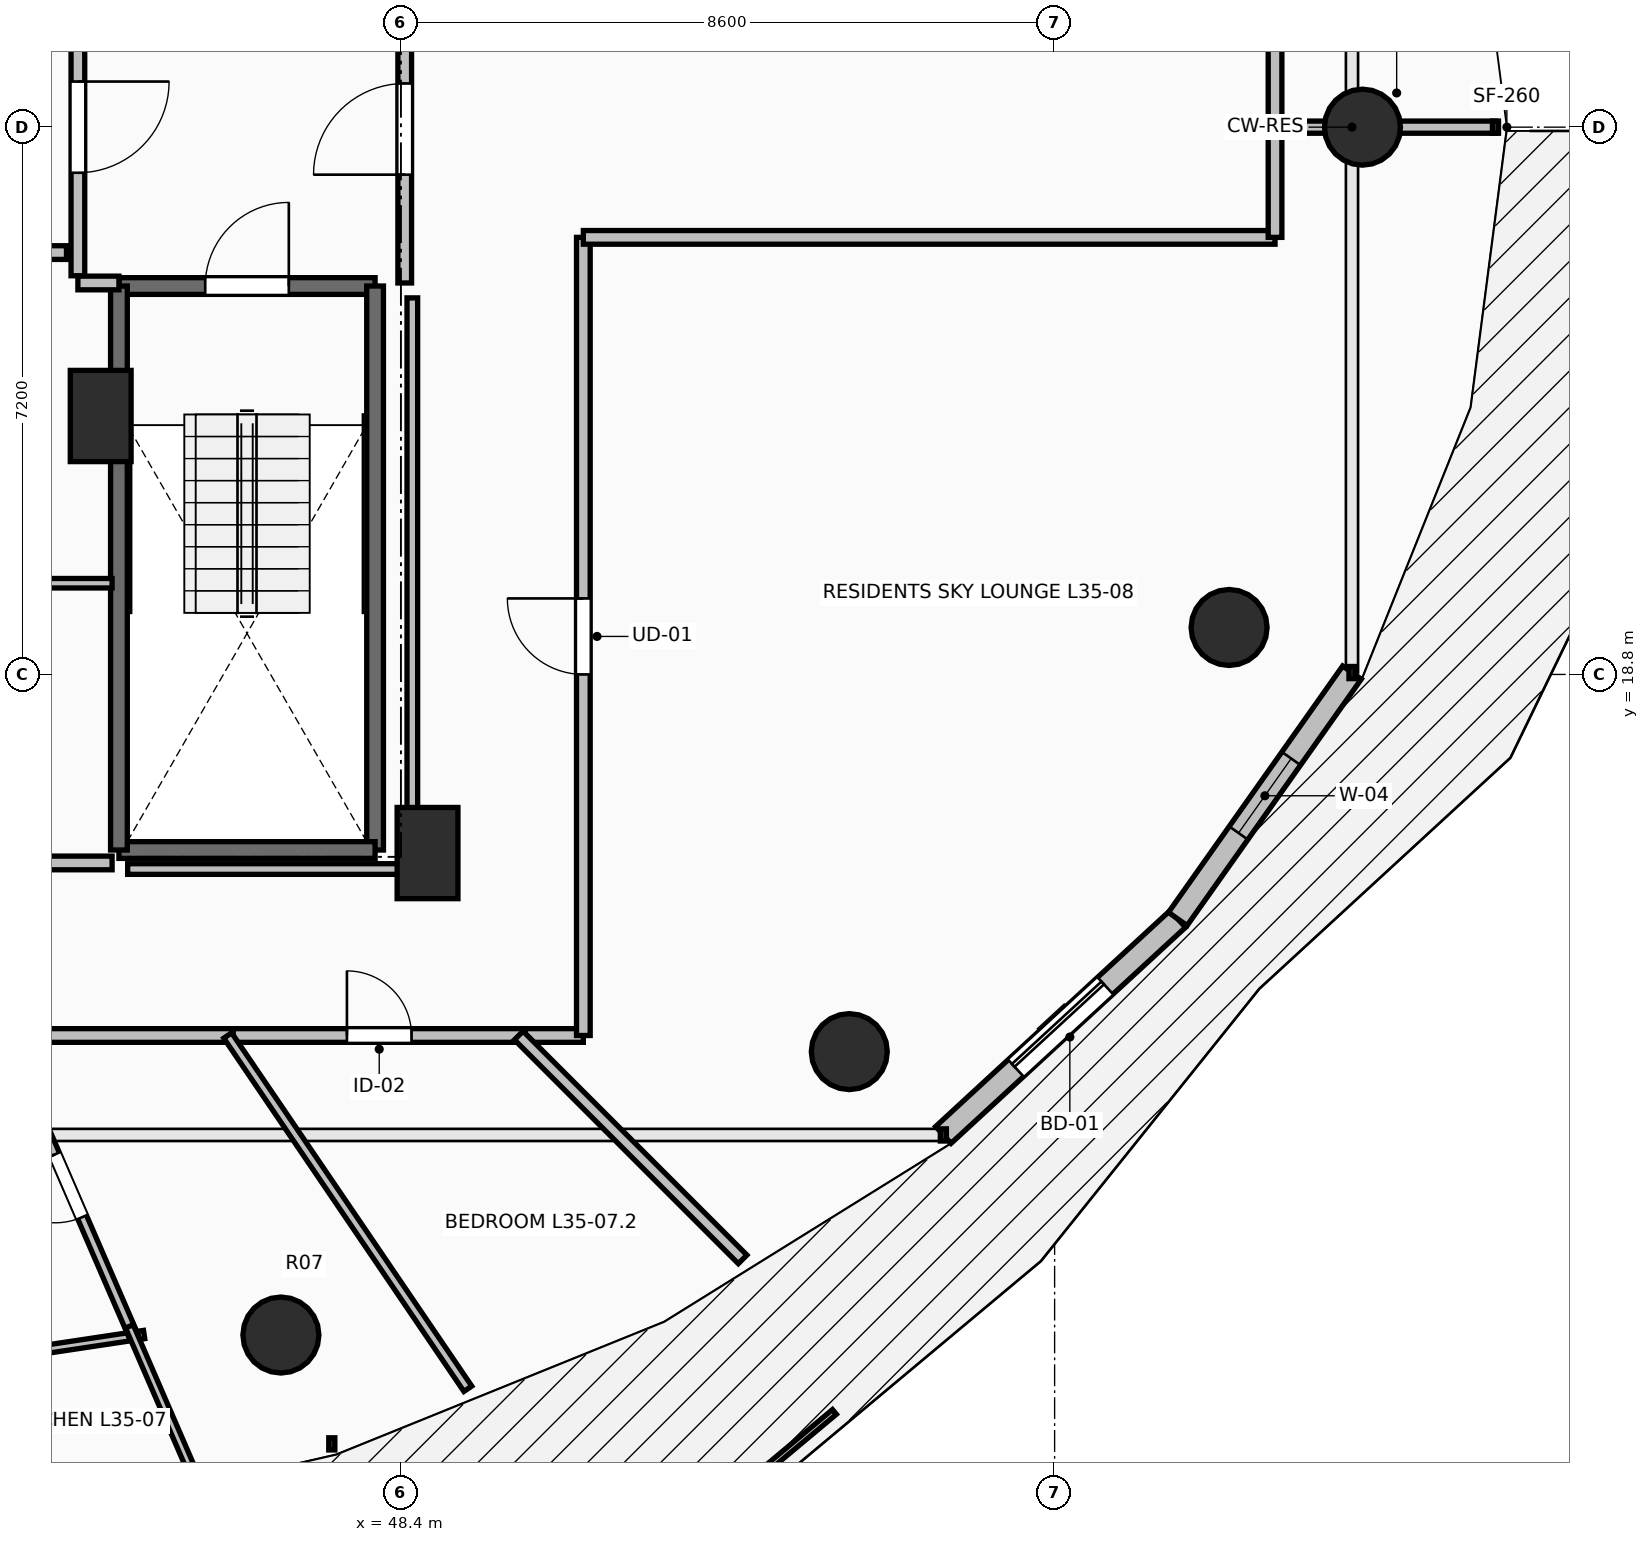
"""IFC4 building model, lengths in metres.
Left out: names, types, materials, properties, quantities, classifications, styles, units other than length and angle.
Written with IfcOpenShell. Run it as: python <this file> out.ifc"""

import sys

from ifc_helpers import new_model, si_unit, direction, frame, frame_2d, origin, origin_2d, place, context, subcontext, project, spatial, rectangle, circle, extrude, element, fill, save


model = new_model("IFC4")
c1 = context("Model", 3, precision=1e-05, world=origin(), true_north=direction((0.0, 1.0)))
c2 = subcontext(c1, "Body", "Model", "MODEL_VIEW")
j1 = project(units=[si_unit("LENGTHUNIT", "METRE"), si_unit("PLANEANGLEUNIT", "RADIAN")], contexts=[c1])
p1 = place(None, origin())
s1 = spatial("IfcSite", under=j1, at=p1, CompositionType="ELEMENT")
p2 = place(p1, origin())
s2 = spatial("IfcBuilding", under=s1, at=p2, CompositionType="ELEMENT")
p3 = place(p2, frame((0.0, 0.0, 132.6)))
s3 = spatial("IfcBuildingStorey", under=s2, at=p3, CompositionType="ELEMENT", Elevation=132.6)
for number, where, z_axis, x_axis in (
    (1, (61.05, 26.0, 0.0), (0.0, 0.0, 1.0), (1.0, 0.0, 0.0)),
    (2, (46.821, 10.109, 0.0), (0.0, 0.0, 1.0), (0.383, -0.924, 0.0)),
    (3, (54.299, 13.838, 0.0), (0.0, 0.0, 1.0), (0.707, -0.707, 0.0)),
    (4, (59.295, 19.418, 0.0), (0.0, 0.0, 1.0), (0.924, -0.383, 0.0)),
):
    element("IfcColumn", number, at=place(p3, frame(where, z_axis=z_axis, x_axis=x_axis)), inside=s3, PredefinedType="COLUMN", context=c2, shape_type="SweptSolid", body=[
        extrude(circle(Radius=0.5, at=origin_2d()), origin(), (0.0, 0.0, 1.0), 3.5),
    ])
for number, where, z_axis, x_axis in (
    (5, (48.75, 16.45, 0.0), (0.0, 0.0, 1.0), (1.0, 0.0, 0.0)),
    (6, (44.45, 22.2, 0.0), (0.0, 0.0, 1.0), (1.0, 0.0, 0.0)),
):
    element("IfcColumn", number, at=place(p3, frame(where, z_axis=z_axis, x_axis=x_axis)), inside=s3, PredefinedType="PILASTER", context=c2, shape_type="SweptSolid", body=[
        extrude(rectangle(XDim=0.8, YDim=1.2, at=origin_2d()), origin(), (0.0, 0.0, 1.0), 3.5),
    ])
p4 = place(p3, frame((55.536, 12.742, 0.0), z_axis=(0.0, 0.0, 1.0), x_axis=(0.735477154165, 0.677549522693, 0.0)))
e7 = element("IfcWall", 7, at=p4, inside=s3, PredefinedType="STANDARD", context=c2, shape_type="SweptSolid", body=[
    extrude(rectangle(XDim=4.194, YDim=0.3, at=frame_2d((2.097, 0.0))), origin(), (0.0, 0.0, 1.0), 3.24),
])
p5 = place(p4, frame((1.297, 0.0, 0.0)))
e8 = element("IfcOpeningElement", 8, at=p5, cuts=e7, PredefinedType="OPENING", context=c2, shape_type="SweptSolid", body=[
    extrude(rectangle(XDim=1.6, YDim=2.3, at=frame_2d((0.8, 1.15))), frame((0.0, 0.165, 0.0), z_axis=(0.0, -1.0, 0.0), x_axis=(1.0, 0.0, 0.0)), (0.0, 0.0, 1.0), 0.33),
])
p6 = place(p3, frame((58.62, 15.583, 0.0), z_axis=(0.0, 0.0, 1.0), x_axis=(0.577269753207, 0.816553508371, 0.0)))
e9 = element("IfcWall", 9, at=p6, inside=s3, PredefinedType="STANDARD", context=c2, shape_type="SweptSolid", body=[
    extrude(rectangle(XDim=3.97, YDim=0.3, at=frame_2d((1.985, 0.0))), origin(), (0.0, 0.0, 1.0), 3.24),
])
p7 = place(p6, frame((1.385, 0.0, 0.85)))
e10 = element("IfcOpeningElement", 10, at=p7, cuts=e9, PredefinedType="OPENING", context=c2, shape_type="SweptSolid", body=[
    extrude(rectangle(XDim=1.2, YDim=2.1, at=frame_2d((0.6, 1.05))), frame((0.0, 0.165, 0.0), z_axis=(0.0, -1.0, 0.0), x_axis=(1.0, 0.0, 0.0)), (0.0, 0.0, 1.0), 0.33),
])
p8 = place(p3, frame((44.69, 23.91, 0.0), z_axis=(0.0, 0.0, 1.0), x_axis=(1.0, 0.0, 0.0)))
e11 = element("IfcWall", 11, at=p8, inside=s3, PredefinedType="SOLIDWALL", context=c2, shape_type="SweptSolid", body=[
    extrude(rectangle(XDim=3.37, YDim=0.22, at=frame_2d((1.685, 0.0))), origin(), (0.0, 0.0, 1.0), 3.24),
])
p9 = place(p8, frame((1.135, 0.0, 0.0)))
e12 = element("IfcOpeningElement", 12, at=p9, cuts=e11, PredefinedType="OPENING", context=c2, shape_type="SweptSolid", body=[
    extrude(rectangle(XDim=1.1, YDim=2.15, at=frame_2d((0.55, 1.075))), frame((0.0, 0.125, 0.0), z_axis=(0.0, -1.0, 0.0), x_axis=(1.0, 0.0, 0.0)), (0.0, 0.0, 1.0), 0.25),
])
p10 = place(p3, frame((48.06, 23.91, 0.0), z_axis=(0.0, 0.0, 1.0), x_axis=(0.0, -1.0, 0.0)))
e13 = element("IfcWall", 13, at=p10, inside=s3, PredefinedType="SOLIDWALL", context=c2, shape_type="SweptSolid", body=[
    extrude(rectangle(XDim=7.42, YDim=0.22, at=frame_2d((3.71, 0.0))), origin(), (0.0, 0.0, 1.0), 3.24),
])
p11 = place(p3, frame((48.06, 16.49, 0.0), z_axis=(0.0, 0.0, 1.0), x_axis=(-1.0, 0.0, 0.0)))
e14 = element("IfcWall", 14, at=p11, inside=s3, PredefinedType="SOLIDWALL", context=c2, shape_type="SweptSolid", body=[
    extrude(rectangle(XDim=3.37, YDim=0.22, at=frame_2d((1.685, 0.0))), origin(), (0.0, 0.0, 1.0), 3.24),
])
p12 = place(p3, frame((44.69, 16.49, 0.0), z_axis=(0.0, 0.0, 1.0), x_axis=(0.0, 1.0, 0.0)))
e15 = element("IfcWall", 15, at=p12, inside=s3, PredefinedType="SOLIDWALL", context=c2, shape_type="SweptSolid", body=[
    extrude(rectangle(XDim=7.42, YDim=0.22, at=frame_2d((3.71, 0.0))), origin(), (0.0, 0.0, 1.0), 3.24),
])
p13 = place(p3, frame((44.15, 27.955, 0.0), z_axis=(0.0, 0.0, 1.0), x_axis=(0.0, -1.0, 0.0)))
e16 = element("IfcWall", 16, at=p13, inside=s3, PredefinedType="PARTITIONING", context=c2, shape_type="SweptSolid", body=[
    extrude(rectangle(XDim=3.91, YDim=0.18, at=frame_2d((1.955, 0.0))), origin(), (0.0, 0.0, 1.0), 3.24),
])
p14 = place(p13, frame((1.355, 0.0, 0.0)))
e17 = element("IfcOpeningElement", 17, at=p14, cuts=e16, PredefinedType="OPENING", context=c2, shape_type="SweptSolid", body=[
    extrude(rectangle(XDim=1.2, YDim=2.15, at=frame_2d((0.6, 1.075))), frame((0.0, 0.105, 0.0), z_axis=(0.0, -1.0, 0.0), x_axis=(1.0, 0.0, 0.0)), (0.0, 0.0, 1.0), 0.21),
])
p15 = place(p3, frame((44.15, 23.95, 0.0), z_axis=(0.0, 0.0, 1.0), x_axis=(1.0, 0.0, 0.0)))
e18 = element("IfcWall", 18, at=p15, inside=s3, PredefinedType="PARTITIONING", context=c2, shape_type="SweptSolid", body=[
    extrude(rectangle(XDim=0.54, YDim=0.18, at=frame_2d((0.27, 0.0))), origin(), (0.0, 0.0, 1.0), 3.24),
])
p16 = place(p3, frame((48.45, 23.95, 0.0), z_axis=(0.0, 0.0, 1.0), x_axis=(0.0, 1.0, 0.0)))
e19 = element("IfcWall", 19, at=p16, inside=s3, PredefinedType="PARTITIONING", context=c2, shape_type="SweptSolid", body=[
    extrude(rectangle(XDim=4.05, YDim=0.18, at=frame_2d((2.025, 0.0))), origin(), (0.0, 0.0, 1.0), 3.24),
])
p17 = place(p16, frame((1.425, 0.0, 0.0)))
e20 = element("IfcOpeningElement", 20, at=p17, cuts=e19, PredefinedType="OPENING", context=c2, shape_type="SweptSolid", body=[
    extrude(rectangle(XDim=1.2, YDim=2.15, at=frame_2d((0.6, 1.075))), frame((0.0, 0.105, 0.0), z_axis=(0.0, -1.0, 0.0), x_axis=(1.0, 0.0, 0.0)), (0.0, 0.0, 1.0), 0.21),
])
p18 = place(p3, frame((41.555, 24.35, 0.0), z_axis=(0.0, 0.0, 1.0), x_axis=(1.0, 0.0, 0.0)))
e21 = element("IfcWall", 21, at=p18, inside=s3, PredefinedType="PARTITIONING", context=c2, shape_type="SweptSolid", body=[
    extrude(rectangle(XDim=2.445, YDim=0.18, at=frame_2d((1.223, 0.0))), origin(), (0.0, 0.0, 1.0), 3.24),
])
p19 = place(p18, frame((0.722, 0.0, 0.0)))
e22 = element("IfcOpeningElement", 22, at=p19, cuts=e21, PredefinedType="OPENING", context=c2, shape_type="SweptSolid", body=[
    extrude(rectangle(XDim=1.0, YDim=2.15, at=frame_2d((0.5, 1.075))), frame((0.0, 0.105, 0.0), z_axis=(0.0, -1.0, 0.0), x_axis=(1.0, 0.0, 0.0)), (0.0, 0.0, 1.0), 0.21),
])
p20 = place(p3, frame((44.6, 20.0, 0.0), z_axis=(0.0, 0.0, 1.0), x_axis=(-1.0, 0.0, 0.0)))
e23 = element("IfcWall", 23, at=p20, inside=s3, PredefinedType="PARTITIONING", context=c2, shape_type="SweptSolid", body=[
    extrude(rectangle(XDim=3.2, YDim=0.125, at=frame_2d((1.6, 0.0))), origin(), (0.0, 0.0, 1.0), 3.24),
])
p21 = place(p3, frame((41.4, 16.32, 0.0), z_axis=(0.0, 0.0, 1.0), x_axis=(1.0, 0.0, 0.0)))
e24 = element("IfcWall", 24, at=p21, inside=s3, PredefinedType="PARTITIONING", context=c2, shape_type="SweptSolid", body=[
    extrude(rectangle(XDim=3.2, YDim=0.18, at=frame_2d((1.6, 0.0))), origin(), (0.0, 0.0, 1.0), 3.24),
])
p22 = place(p21, frame((1.2, 0.0, 0.0)))
e25 = element("IfcOpeningElement", 25, at=p22, cuts=e24, PredefinedType="OPENING", context=c2, shape_type="SweptSolid", body=[
    extrude(rectangle(XDim=0.8, YDim=2.05, at=frame_2d((0.4, 1.025))), frame((0.0, 0.105, 0.0), z_axis=(0.0, -1.0, 0.0), x_axis=(1.0, 0.0, 0.0)), (0.0, 0.0, 1.0), 0.21),
])
p23 = place(p3, frame((59.9, 25.94, 0.0), z_axis=(0.0, 0.0, 1.0), x_axis=(0.0, 1.0, 0.0)))
e26 = element("IfcWall", 26, at=p23, inside=s3, PredefinedType="PARTITIONING", context=c2, shape_type="SweptSolid", body=[
    extrude(rectangle(XDim=1.31, YDim=0.18, at=frame_2d((0.655, 0.0))), origin(), (0.0, 0.0, 1.0), 2.432),
])
p24 = place(p3, frame((43.236, 14.05, 0.0), z_axis=(0.0, 0.0, 1.0), x_axis=(1.0, 0.0, 0.0)))
e27 = element("IfcWall", 27, at=p24, inside=s3, PredefinedType="PARTITIONING", context=c2, shape_type="SweptSolid", body=[
    extrude(rectangle(XDim=2.958, YDim=0.18, at=frame_2d((1.479, 0.0))), origin(), (0.0, 0.0, 1.0), 2.432),
])
p25 = place(p3, frame((46.194, 14.05, 0.0), z_axis=(0.0, 0.0, 1.0), x_axis=(1.0, 0.0, 0.0)))
e28 = element("IfcWall", 28, at=p25, inside=s3, PredefinedType="PARTITIONING", context=c2, shape_type="SweptSolid", body=[
    extrude(rectangle(XDim=3.841, YDim=0.18, at=frame_2d((1.92, 0.0))), origin(), (0.0, 0.0, 1.0), 2.432),
])
p26 = place(p25, frame((1.496, 0.0, 0.0)))
e29 = element("IfcOpeningElement", 29, at=p26, cuts=e28, PredefinedType="OPENING", context=c2, shape_type="SweptSolid", body=[
    extrude(rectangle(XDim=0.85, YDim=2.1, at=frame_2d((0.425, 1.05))), frame((0.0, 0.105, 0.0), z_axis=(0.0, -1.0, 0.0), x_axis=(1.0, 0.0, 0.0)), (0.0, 0.0, 1.0), 0.21),
])
p27 = place(p3, frame((50.035, 14.05, 0.0), z_axis=(0.0, 0.0, 1.0), x_axis=(1.0, 0.0, 0.0)))
e30 = element("IfcWall", 30, at=p27, inside=s3, PredefinedType="PARTITIONING", context=c2, shape_type="SweptSolid", body=[
    extrude(rectangle(XDim=0.765, YDim=0.18, at=frame_2d((0.383, 0.0))), origin(), (0.0, 0.0, 1.0), 2.874),
])
p28 = place(p3, frame((50.8, 14.05, 0.0), z_axis=(0.0, 0.0, 1.0), x_axis=(0.0, 1.0, 0.0)))
e31 = element("IfcWall", 31, at=p28, inside=s3, PredefinedType="PARTITIONING", context=c2, shape_type="SweptSolid", body=[
    extrude(rectangle(XDim=10.5, YDim=0.18, at=frame_2d((5.25, 0.0))), origin(), (0.0, 0.0, 1.0), 2.432),
])
p29 = place(p28, frame((4.75, 0.0, 0.0)))
e32 = element("IfcOpeningElement", 32, at=p29, cuts=e31, PredefinedType="OPENING", context=c2, shape_type="SweptSolid", body=[
    extrude(rectangle(XDim=1.0, YDim=2.15, at=frame_2d((0.5, 1.075))), frame((0.0, 0.105, 0.0), z_axis=(0.0, -1.0, 0.0), x_axis=(1.0, 0.0, 0.0)), (0.0, 0.0, 1.0), 0.21),
])
p30 = place(p3, frame((50.8, 24.55, 0.0), z_axis=(0.0, 0.0, 1.0), x_axis=(1.0, 0.0, 0.0)))
e33 = element("IfcWall", 33, at=p30, inside=s3, PredefinedType="PARTITIONING", context=c2, shape_type="SweptSolid", body=[
    extrude(rectangle(XDim=9.1, YDim=0.18, at=frame_2d((4.55, 0.0))), origin(), (0.0, 0.0, 1.0), 2.432),
])
p31 = place(p3, frame((59.9, 24.55, 0.0), z_axis=(0.0, 0.0, 1.0), x_axis=(0.0, 1.0, 0.0)))
e34 = element("IfcWall", 34, at=p31, inside=s3, PredefinedType="PARTITIONING", context=c2, shape_type="SweptSolid", body=[
    extrude(rectangle(XDim=1.39, YDim=0.18, at=frame_2d((0.695, 0.0))), origin(), (0.0, 0.0, 1.0), 2.432),
])
p32 = place(p3, frame((59.9, 26.0, 0.0), z_axis=(0.0, 0.0, 1.0), x_axis=(1.0, 0.0, 0.0)))
e35 = element("IfcWall", 35, at=p32, inside=s3, PredefinedType="PARTITIONING", context=c2, shape_type="SweptSolid", body=[
    extrude(rectangle(XDim=2.899, YDim=0.16, at=frame_2d((1.45, 0.0))), origin(), (0.0, 0.0, 1.0), 2.432),
])
p33 = place(p3, frame((41.128, 9.53, 0.0), z_axis=(0.0, 0.0, 1.0), x_axis=(0.988884902331, 0.148683051965, 0.0)))
e36 = element("IfcWall", 36, at=p33, inside=s3, PredefinedType="PARTITIONING", context=c2, shape_type="SweptSolid", body=[
    extrude(rectangle(XDim=3.938, YDim=0.11, at=frame_2d((1.969, 0.0))), origin(), (0.0, 0.0, 1.0), 3.24),
])
p34 = place(p33, frame((1.519, 0.0, 0.0)))
e37 = element("IfcOpeningElement", 37, at=p34, cuts=e36, PredefinedType="OPENING", context=c2, shape_type="SweptSolid", body=[
    extrude(rectangle(XDim=0.9, YDim=2.1, at=frame_2d((0.45, 1.05))), frame((0.0, 0.07, 0.0), z_axis=(0.0, -1.0, 0.0), x_axis=(1.0, 0.0, 0.0)), (0.0, 0.0, 1.0), 0.14),
])
p35 = place(p3, frame((44.883, 10.095, 0.0), z_axis=(0.0, 0.0, 1.0), x_axis=(-0.397273563399, 0.917700232006, 0.0)))
e38 = element("IfcWall", 38, at=p35, inside=s3, PredefinedType="PARTITIONING", context=c2, shape_type="SweptSolid", body=[
    extrude(rectangle(XDim=4.31, YDim=0.125, at=frame_2d((2.155, 0.0))), origin(), (0.0, 0.0, 1.0), 2.432),
])
p36 = place(p35, frame((1.705, 0.0, 0.0)))
e39 = element("IfcOpeningElement", 39, at=p36, cuts=e38, PredefinedType="OPENING", context=c2, shape_type="SweptSolid", body=[
    extrude(rectangle(XDim=0.9, YDim=2.1, at=frame_2d((0.45, 1.05))), frame((0.0, 0.077, 0.0), z_axis=(0.0, -1.0, 0.0), x_axis=(1.0, 0.0, 0.0)), (0.0, 0.0, 1.0), 0.155),
])
p37 = place(p3, frame((45.732, 8.134, 0.0), z_axis=(0.0, 0.0, 1.0), x_axis=(-0.397125966554, 0.91776411277, 0.0)))
e40 = element("IfcWall", 40, at=p37, inside=s3, PredefinedType="PARTITIONING", context=c2, shape_type="SweptSolid", body=[
    extrude(rectangle(XDim=2.277, YDim=0.11, at=frame_2d((1.139, 0.0))), origin(), (0.0, 0.0, 1.0), 2.728),
])
p38 = place(p3, frame((49.28, 9.402, 0.0), z_axis=(0.0, 0.0, 1.0), x_axis=(-0.562106811751, 0.827064648128, 0.0)))
e41 = element("IfcWall", 41, at=p38, inside=s3, PredefinedType="PARTITIONING", context=c2, shape_type="SweptSolid", body=[
    extrude(rectangle(XDim=5.62, YDim=0.125, at=frame_2d((2.81, 0.0))), origin(), (0.0, 0.0, 1.0), 2.432),
])
p39 = place(p3, frame((52.895, 11.105, 0.0), z_axis=(0.0, 0.0, 1.0), x_axis=(-0.707106781187, 0.707106781187, 0.0)))
e42 = element("IfcWall", 42, at=p39, inside=s3, PredefinedType="PARTITIONING", context=c2, shape_type="SweptSolid", body=[
    extrude(rectangle(XDim=4.165, YDim=0.16, at=frame_2d((2.083, 0.0))), origin(), (0.0, 0.0, 1.0), 2.728),
])
p40 = place(p3, frame((44.805, 16.24, 0.0), z_axis=(0.0, 0.0, 1.0), x_axis=(1.0, 0.0, 0.0)))
e43 = element("IfcWall", 43, at=p40, inside=s3, PredefinedType="PARTITIONING", context=c2, shape_type="SweptSolid", body=[
    extrude(rectangle(XDim=3.745, YDim=0.14, at=frame_2d((1.873, 0.0))), origin(), (0.0, 0.0, 1.0), 2.432),
])
p41 = place(p3, frame((48.55, 16.24, 0.0), z_axis=(0.0, 0.0, 1.0), x_axis=(0.0, 1.0, 0.0)))
e44 = element("IfcWall", 44, at=p41, inside=s3, PredefinedType="PARTITIONING", context=c2, shape_type="SweptSolid", body=[
    extrude(rectangle(XDim=7.514, YDim=0.14, at=frame_2d((3.757, 0.0))), origin(), (0.0, 0.0, 1.0), 2.432),
])
p42 = place(p5, origin())
e45 = element("IfcDoor", 45, at=p42, inside=s3, OperationType="SLIDING_TO_LEFT", PredefinedType="DOOR", context=c2, shape_type="SweptSolid", body=[
    extrude(rectangle(XDim=1.6, YDim=2.3, at=frame_2d((0.8, 1.15))), frame((0.0, 0.025, 0.0), z_axis=(0.0, -1.0, 0.0), x_axis=(1.0, 0.0, 0.0)), (0.0, 0.0, 1.0), 0.05),
])
fill(e8, e45)
p43 = place(p7, origin())
e46 = element("IfcWindow", 46, at=p43, inside=s3, PartitioningType="SINGLE_PANEL", PredefinedType="WINDOW", context=c2, shape_type="SweptSolid", body=[
    extrude(rectangle(XDim=1.2, YDim=2.1, at=frame_2d((0.6, 1.05))), frame((0.0, 0.03, 0.0), z_axis=(0.0, -1.0, 0.0), x_axis=(1.0, 0.0, 0.0)), (0.0, 0.0, 1.0), 0.06),
])
fill(e10, e46)
p44 = place(p9, origin())
e47 = element("IfcDoor", 47, at=p44, inside=s3, OperationType="SINGLE_SWING_RIGHT", PredefinedType="DOOR", context=c2, shape_type="SweptSolid", body=[
    extrude(rectangle(XDim=1.1, YDim=2.15, at=frame_2d((0.55, 1.075))), frame((0.0, 0.025, 0.0), z_axis=(0.0, -1.0, 0.0), x_axis=(1.0, 0.0, 0.0)), (0.0, 0.0, 1.0), 0.05),
])
fill(e12, e47)
p45 = place(p14, origin())
e48 = element("IfcDoor", 48, at=p45, inside=s3, OperationType="SINGLE_SWING_LEFT", PredefinedType="DOOR", context=c2, shape_type="SweptSolid", body=[
    extrude(rectangle(XDim=1.2, YDim=2.15, at=frame_2d((0.6, 1.075))), frame((0.0, 0.025, 0.0), z_axis=(0.0, -1.0, 0.0), x_axis=(1.0, 0.0, 0.0)), (0.0, 0.0, 1.0), 0.05),
])
fill(e17, e48)
p46 = place(p17, origin())
e49 = element("IfcDoor", 49, at=p46, inside=s3, OperationType="SINGLE_SWING_LEFT", PredefinedType="DOOR", context=c2, shape_type="SweptSolid", body=[
    extrude(rectangle(XDim=1.2, YDim=2.15, at=frame_2d((0.6, 1.075))), frame((0.0, 0.025, 0.0), z_axis=(0.0, -1.0, 0.0), x_axis=(1.0, 0.0, 0.0)), (0.0, 0.0, 1.0), 0.05),
])
fill(e20, e49)
p47 = place(p29, origin())
e50 = element("IfcDoor", 50, at=p47, inside=s3, OperationType="SINGLE_SWING_RIGHT", PredefinedType="DOOR", context=c2, shape_type="SweptSolid", body=[
    extrude(rectangle(XDim=1.0, YDim=2.15, at=frame_2d((0.5, 1.075))), frame((0.0, 0.025, 0.0), z_axis=(0.0, -1.0, 0.0), x_axis=(1.0, 0.0, 0.0)), (0.0, 0.0, 1.0), 0.05),
])
fill(e32, e50)
p48 = place(p36, origin())
e51 = element("IfcDoor", 51, at=p48, inside=s3, OperationType="SINGLE_SWING_RIGHT", PredefinedType="DOOR", context=c2, shape_type="SweptSolid", body=[
    extrude(rectangle(XDim=0.9, YDim=2.1, at=frame_2d((0.45, 1.05))), frame((0.0, 0.025, 0.0), z_axis=(0.0, -1.0, 0.0), x_axis=(1.0, 0.0, 0.0)), (0.0, 0.0, 1.0), 0.05),
])
fill(e39, e51)
p49 = place(p26, origin())
e52 = element("IfcDoor", 52, at=p49, inside=s3, OperationType="SINGLE_SWING_LEFT", PredefinedType="DOOR", context=c2, shape_type="SweptSolid", body=[
    extrude(rectangle(XDim=0.85, YDim=2.1, at=frame_2d((0.425, 1.05))), frame((0.0, 0.025, 0.0), z_axis=(0.0, -1.0, 0.0), x_axis=(1.0, 0.0, 0.0)), (0.0, 0.0, 1.0), 0.05),
])
fill(e29, e52)
save(model, sys.argv[1])
